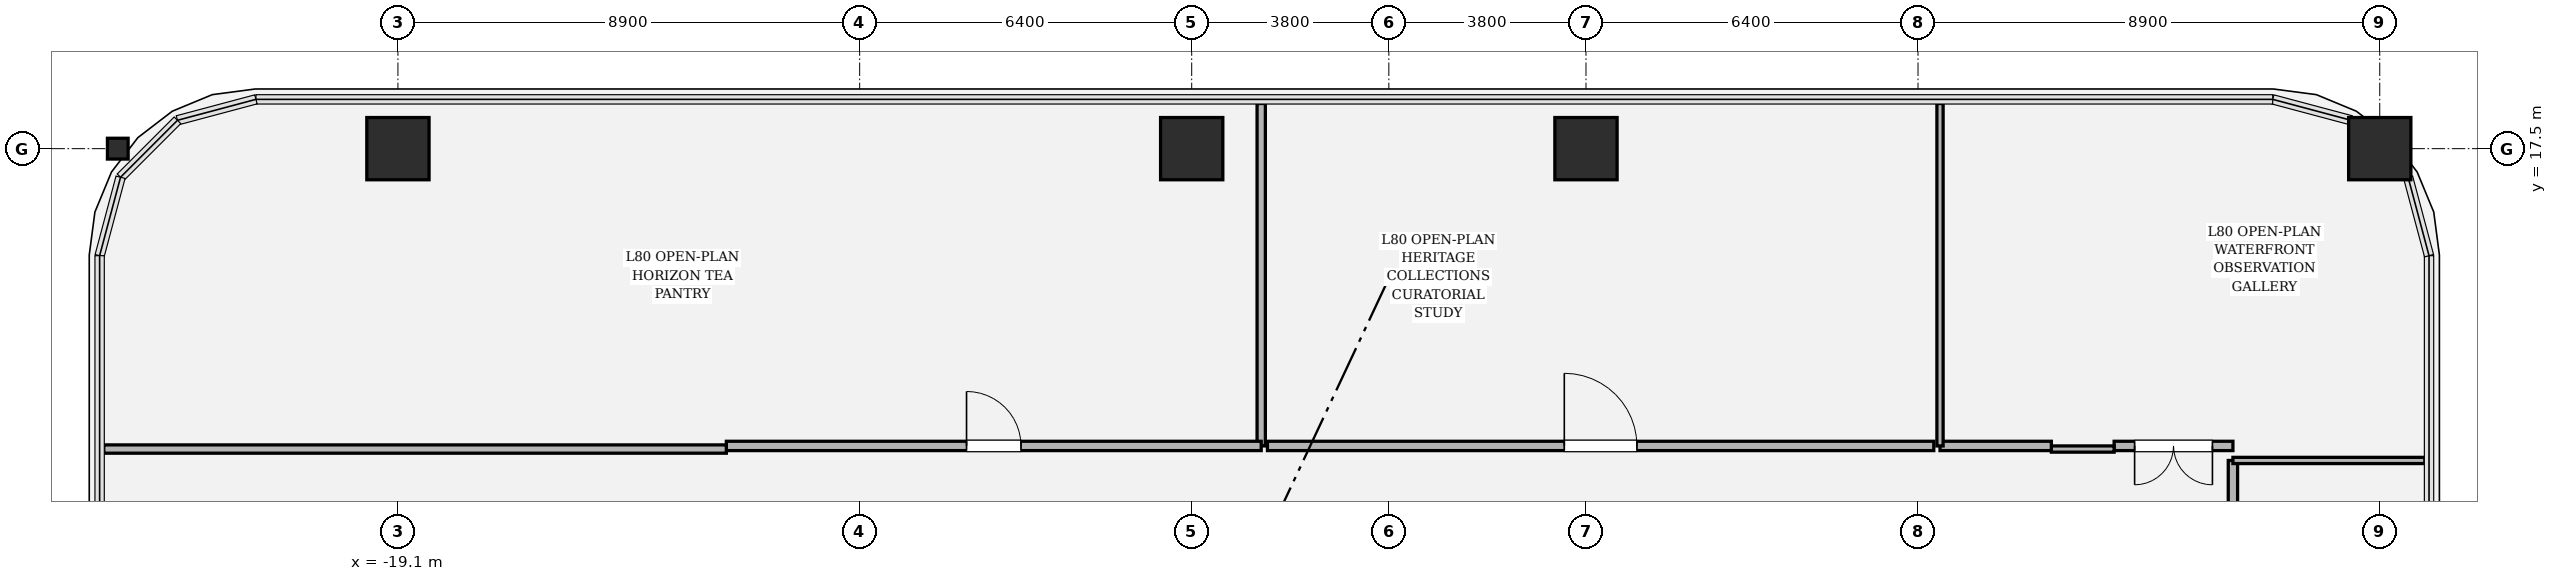
"""IFC4 building model, lengths in metres.
Left out: names, types, materials, properties, quantities, classifications, styles, units other than length and angle.
Written with IfcOpenShell. Run it as: python <this file> out.ifc"""

import sys

from ifc_helpers import new_model, si_unit, direction, frame, frame_2d, origin, origin_2d, place, context, subcontext, project, spatial, rectangle, hollow_rectangle, i_section, extrude, element, fill, save


model = new_model("IFC4")
c1 = context("Model", 3, precision=1e-05, world=origin(), true_north=direction((0.0, 1.0)))
c2 = subcontext(c1, "Body", "Model", "MODEL_VIEW")
j1 = project(units=[si_unit("LENGTHUNIT", "METRE"), si_unit("PLANEANGLEUNIT", "RADIAN")], contexts=[c1])
p1 = place(None, origin())
s1 = spatial("IfcSite", under=j1, at=p1, CompositionType="ELEMENT")
p2 = place(p1, origin())
s2 = spatial("IfcBuilding", under=s1, at=p2, CompositionType="ELEMENT")
p3 = place(p2, frame((0.0, 0.0, 339.0)))
s3 = spatial("IfcBuildingStorey", under=s2, at=p3, CompositionType="ELEMENT", Elevation=339.0)
for number, where, z_axis, x_axis in (
    (1, (19.1, 17.5, 0.0), (0.0, 0.0, 1.0), (1.0, 0.0, 0.0)),
    (2, (3.8, 17.5, 0.0), (0.0, 0.0, 1.0), (1.0, 0.0, 0.0)),
    (3, (-3.8, 17.5, 0.0), (0.0, 0.0, 1.0), (1.0, 0.0, 0.0)),
    (4, (-19.1, 17.5, 0.0), (0.0, 0.0, 1.0), (1.0, 0.0, 0.0)),
):
    element("IfcColumn", number, at=place(p3, frame(where, z_axis=z_axis, x_axis=x_axis)), inside=s3, PredefinedType="COLUMN", context=c2, shape_type="SweptSolid", body=[
        extrude(hollow_rectangle(XDim=1.2, YDim=1.2, WallThickness=0.035, at=origin_2d()), origin(), (0.0, 0.0, 1.0), 4.8),
    ])
p4 = place(p3, frame((-24.5, 17.5, 0.0), z_axis=(0.0, 0.0, 1.0), x_axis=(0.0, 1.0, 0.0)))
e5 = element("IfcColumn", 5, at=p4, inside=s3, PredefinedType="COLUMN", context=c2, shape_type="SweptSolid", body=[
    extrude(i_section(OverallWidth=0.401, OverallDepth=0.399, WebThickness=0.025, FlangeThickness=0.04, FilletRadius=0.018, at=origin_2d()), origin(), (0.0, 0.0, 1.0), 4.798),
])
p5 = place(p3, frame((16.27, -1.89, 0.0), z_axis=(0.0, 0.0, 1.0), x_axis=(0.0, 1.0, 0.0)))
e6 = element("IfcWall", 6, at=p5, inside=s3, PredefinedType="PARTITIONING", context=c2, shape_type="SweptSolid", body=[
    extrude(rectangle(XDim=13.38, YDim=0.18, at=frame_2d((6.69, 0.0))), origin(), (0.0, 0.0, 1.0), 3.194),
])
p6 = place(p5, frame((6.165, 0.0, 0.0)))
e7 = element("IfcOpeningElement", 7, at=p6, cuts=e6, PredefinedType="OPENING", context=c2, shape_type="SweptSolid", body=[
    extrude(rectangle(XDim=1.05, YDim=2.2, at=frame_2d((0.525, 1.1))), frame((0.0, 0.1, 0.0), z_axis=(0.0, -1.0, 0.0), x_axis=(1.0, 0.0, 0.0)), (0.0, 0.0, 1.0), 0.2),
])
p7 = place(p3, frame((16.27, 11.49, 0.0), z_axis=(0.0, 0.0, 1.0), x_axis=(1.0, 0.0, 0.0)))
e8 = element("IfcWall", 8, at=p7, inside=s3, PredefinedType="PARTITIONING", context=c2, shape_type="SweptSolid", body=[
    extrude(rectangle(XDim=3.7, YDim=0.12, at=frame_2d((1.85, 0.0))), origin(), (0.0, 0.0, 1.0), 3.194),
])
p8 = place(p3, frame((-2.46, 18.37, 0.0), z_axis=(0.0, 0.0, 1.0), x_axis=(0.0, -1.0, 0.0)))
e9 = element("IfcWall", 9, at=p8, inside=s3, PredefinedType="PARTITIONING", context=c2, shape_type="SweptSolid", body=[
    extrude(rectangle(XDim=6.6, YDim=0.16, at=frame_2d((3.3, 0.0))), origin(), (0.0, 0.0, 1.0), 3.194),
])
p9 = place(p3, frame((-2.46, 11.77, 0.0), z_axis=(0.0, 0.0, 1.0), x_axis=(-1.0, 0.0, 0.0)))
e10 = element("IfcWall", 10, at=p9, inside=s3, PredefinedType="PARTITIONING", context=c2, shape_type="SweptSolid", body=[
    extrude(rectangle(XDim=10.31, YDim=0.18, at=frame_2d((5.155, 0.0))), origin(), (0.0, 0.0, 1.0), 3.194),
])
p10 = place(p9, frame((4.63, 0.0, 0.0)))
e11 = element("IfcOpeningElement", 11, at=p10, cuts=e10, PredefinedType="OPENING", context=c2, shape_type="SweptSolid", body=[
    extrude(rectangle(XDim=1.05, YDim=2.2, at=frame_2d((0.525, 1.1))), frame((0.0, 0.1, 0.0), z_axis=(0.0, -1.0, 0.0), x_axis=(1.0, 0.0, 0.0)), (0.0, 0.0, 1.0), 0.2),
])
p11 = place(p3, frame((-12.77, 11.71, 0.0), z_axis=(0.0, 0.0, 1.0), x_axis=(-1.0, 0.0, 0.0)))
e12 = element("IfcWall", 12, at=p11, inside=s3, PredefinedType="PARTITIONING", context=c2, shape_type="SweptSolid", body=[
    extrude(rectangle(XDim=12.0, YDim=0.16, at=frame_2d((6.0, 0.0))), origin(), (0.0, 0.0, 1.0), 3.194),
])
p12 = place(p3, frame((16.27, 11.77, 0.0), z_axis=(0.0, 0.0, 1.0), x_axis=(-1.0, 0.0, 0.0)))
e13 = element("IfcWall", 13, at=p12, inside=s3, PredefinedType="PARTITIONING", context=c2, shape_type="SweptSolid", body=[
    extrude(rectangle(XDim=2.29, YDim=0.18, at=frame_2d((1.145, 0.0))), origin(), (0.0, 0.0, 1.0), 4.52),
])
p13 = place(p12, frame((0.395, 0.0, 0.0)))
e14 = element("IfcOpeningElement", 14, at=p13, cuts=e13, PredefinedType="OPENING", context=c2, shape_type="SweptSolid", body=[
    extrude(rectangle(XDim=1.5, YDim=2.3, at=frame_2d((0.75, 1.15))), frame((0.0, 0.1, 0.0), z_axis=(0.0, -1.0, 0.0), x_axis=(1.0, 0.0, 0.0)), (0.0, 0.0, 1.0), 0.2),
])
p14 = place(p3, frame((13.98, 11.71, 0.0), z_axis=(0.0, 0.0, 1.0), x_axis=(-1.0, 0.0, 0.0)))
e15 = element("IfcWall", 15, at=p14, inside=s3, PredefinedType="PARTITIONING", context=c2, shape_type="SweptSolid", body=[
    extrude(rectangle(XDim=1.21, YDim=0.12, at=frame_2d((0.605, 0.0))), origin(), (0.0, 0.0, 1.0), 4.52),
])
p15 = place(p3, frame((12.77, 11.77, 0.0), z_axis=(0.0, 0.0, 1.0), x_axis=(-1.0, 0.0, 0.0)))
e16 = element("IfcWall", 16, at=p15, inside=s3, PredefinedType="PARTITIONING", context=c2, shape_type="SweptSolid", body=[
    extrude(rectangle(XDim=2.146, YDim=0.18, at=frame_2d((1.073, 0.0))), origin(), (0.0, 0.0, 1.0), 4.52),
])
p16 = place(p3, frame((10.624, 11.77, 0.0), z_axis=(0.0, 0.0, 1.0), x_axis=(0.0, 1.0, 0.0)))
e17 = element("IfcWall", 17, at=p16, inside=s3, PredefinedType="PARTITIONING", context=c2, shape_type="SweptSolid", body=[
    extrude(rectangle(XDim=6.6, YDim=0.12, at=frame_2d((3.3, 0.0))), origin(), (0.0, 0.0, 1.0), 3.194),
])
p17 = place(p3, frame((10.504, 11.77, 0.0), z_axis=(0.0, 0.0, 1.0), x_axis=(-1.0, 0.0, 0.0)))
e18 = element("IfcWall", 18, at=p17, inside=s3, PredefinedType="PARTITIONING", context=c2, shape_type="SweptSolid", body=[
    extrude(rectangle(XDim=12.844, YDim=0.18, at=frame_2d((6.422, 0.0))), origin(), (0.0, 0.0, 1.0), 3.194),
])
p18 = place(p17, frame((5.722, 0.0, 0.0)))
e19 = element("IfcOpeningElement", 19, at=p18, cuts=e18, PredefinedType="OPENING", context=c2, shape_type="SweptSolid", body=[
    extrude(rectangle(XDim=1.4, YDim=2.25, at=frame_2d((0.7, 1.125))), frame((0.0, 0.1, 0.0), z_axis=(0.0, -1.0, 0.0), x_axis=(1.0, 0.0, 0.0)), (0.0, 0.0, 1.0), 0.2),
])
p19 = place(p10, origin())
e20 = element("IfcDoor", 20, at=p19, inside=s3, OperationType="SINGLE_SWING_RIGHT", PredefinedType="DOOR", context=c2, shape_type="SweptSolid", body=[
    extrude(rectangle(XDim=1.05, YDim=2.2, at=frame_2d((0.525, 1.1))), frame((0.0, 0.025, 0.0), z_axis=(0.0, -1.0, 0.0), x_axis=(1.0, 0.0, 0.0)), (0.0, 0.0, 1.0), 0.05),
])
fill(e11, e20)
p20 = place(p13, origin())
e21 = element("IfcDoor", 21, at=p20, inside=s3, OperationType="DOUBLE_DOOR_SINGLE_SWING", PredefinedType="DOOR", context=c2, shape_type="SweptSolid", body=[
    extrude(rectangle(XDim=1.5, YDim=2.3, at=frame_2d((0.75, 1.15))), frame((0.0, 0.025, 0.0), z_axis=(0.0, -1.0, 0.0), x_axis=(1.0, 0.0, 0.0)), (0.0, 0.0, 1.0), 0.05),
])
fill(e14, e21)
p21 = place(p18, origin())
e22 = element("IfcDoor", 22, at=p21, inside=s3, OperationType="SINGLE_SWING_RIGHT", PredefinedType="DOOR", context=c2, shape_type="SweptSolid", body=[
    extrude(rectangle(XDim=1.4, YDim=2.25, at=frame_2d((0.7, 1.125))), frame((0.0, 0.025, 0.0), z_axis=(0.0, -1.0, 0.0), x_axis=(1.0, 0.0, 0.0)), (0.0, 0.0, 1.0), 0.05),
])
fill(e19, e22)
save(model, sys.argv[1])
